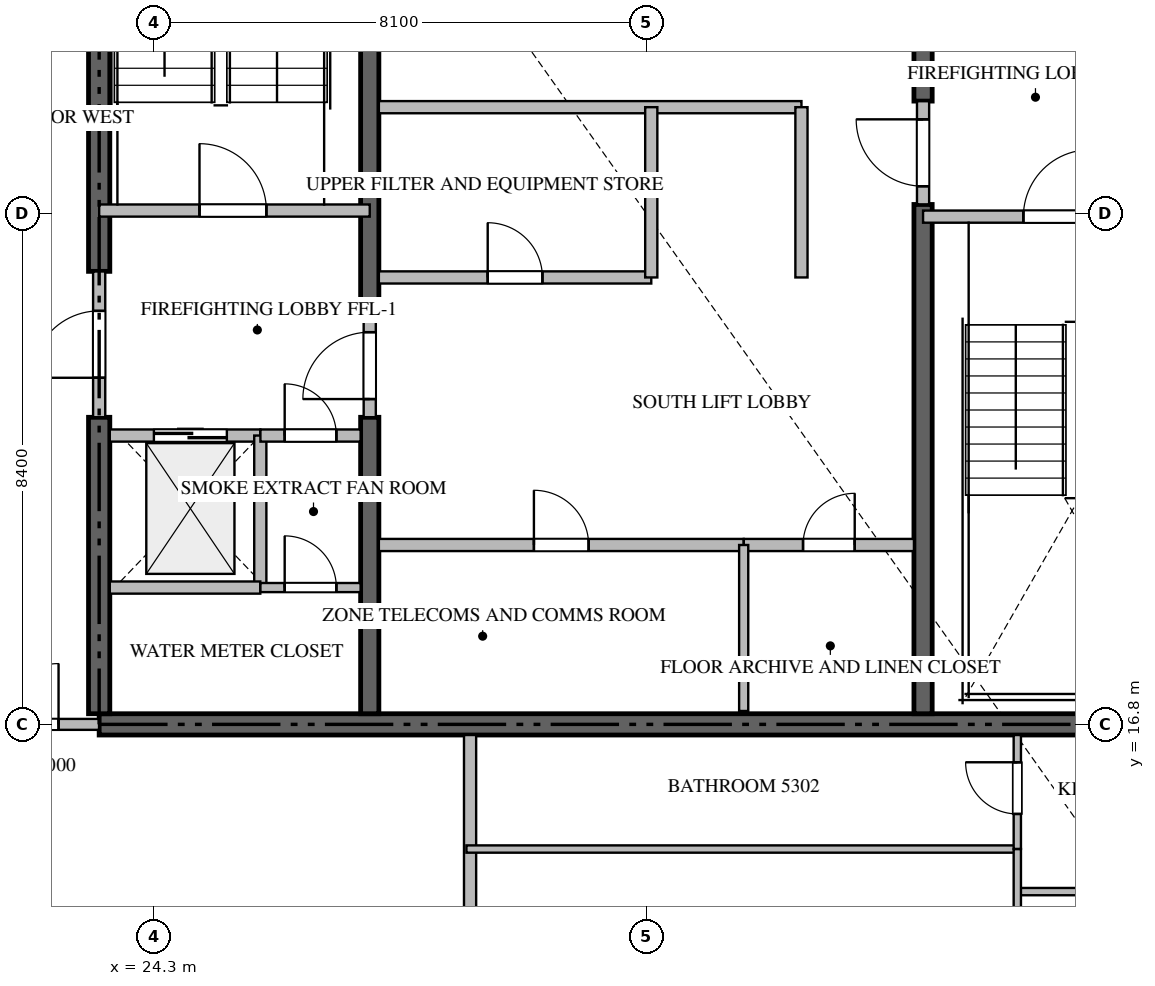
"""IFC4 building model, lengths in metres.
Left out: names, types, materials, properties, quantities, classifications, styles, units other than length and angle.
Written with IfcOpenShell. Run it as: python <this file> out.ifc"""

import sys

from ifc_helpers import new_model, si_unit, direction, frame, frame_2d, origin, place, context, subcontext, project, spatial, rectangle, extrude, source, transform, mapped, element, fill, save


model = new_model("IFC4")
c1 = context("Model", 3, precision=1e-05, world=origin(), true_north=direction((0.0, 1.0)))
c2 = subcontext(c1, "Body", "Model", "MODEL_VIEW")
j1 = project(units=[si_unit("LENGTHUNIT", "METRE"), si_unit("PLANEANGLEUNIT", "RADIAN")], contexts=[c1])
p1 = place(None, origin())
s1 = spatial("IfcSite", under=j1, at=p1, CompositionType="ELEMENT")
p2 = place(p1, origin())
s2 = spatial("IfcBuilding", under=s1, at=p2, CompositionType="ELEMENT")
p3 = place(p2, frame((0.0, 0.0, 214.3)))
s3 = spatial("IfcBuildingStorey", under=s2, at=p3, CompositionType="ELEMENT", Elevation=214.3)
p4 = place(p3, frame((23.4, 16.8, -0.26), z_axis=(0.0, 0.0, 1.0), x_axis=(1.0, 0.0, 0.0)))
e1 = element("IfcWall", 1, at=p4, inside=s3, PredefinedType="SHEAR", context=c2, shape_type="SweptSolid", body=[
    extrude(rectangle(XDim=18.0, YDim=0.35, at=frame_2d((9.0, 0.0))), origin(), (0.0, 0.0, 1.0), 3.848),
])
p5 = place(p3, frame((23.4, 16.975, -0.26), z_axis=(0.0, 0.0, 1.0), x_axis=(0.0, 1.0, 0.0)))
e2 = element("IfcWall", 2, at=p5, inside=s3, PredefinedType="SHEAR", context=c2, shape_type="SweptSolid", body=[
    extrude(rectangle(XDim=4.875, YDim=0.35, at=frame_2d((2.438, 0.0))), origin(), (0.0, 0.0, 1.0), 3.848),
])
p6 = place(p3, frame((23.4, 24.25, -0.26), z_axis=(0.0, 0.0, 1.0), x_axis=(0.0, 1.0, 0.0)))
e3 = element("IfcWall", 3, at=p6, inside=s3, PredefinedType="SHEAR", context=c2, shape_type="SweptSolid", body=[
    extrude(rectangle(XDim=9.175, YDim=0.35, at=frame_2d((4.587, 0.0))), origin(), (0.0, 0.0, 1.0), 3.848),
])
p7 = place(p3, frame((27.85, 16.975, -0.26), z_axis=(0.0, 0.0, 1.0), x_axis=(0.0, 1.0, 0.0)))
e4 = element("IfcWall", 4, at=p7, inside=s3, PredefinedType="SHEAR", context=c2, shape_type="SweptSolid", body=[
    extrude(rectangle(XDim=4.875, YDim=0.3, at=frame_2d((2.438, 0.0))), origin(), (0.0, 0.0, 1.0), 3.848),
])
p8 = place(p3, frame((27.85, 23.55, -0.26), z_axis=(0.0, 0.0, 1.0), x_axis=(0.0, 1.0, 0.0)))
e5 = element("IfcWall", 5, at=p8, inside=s3, PredefinedType="SHEAR", context=c2, shape_type="SweptSolid", body=[
    extrude(rectangle(XDim=9.875, YDim=0.3, at=frame_2d((4.938, 0.0))), origin(), (0.0, 0.0, 1.0), 3.848),
])
p9 = place(p3, frame((36.95, 16.975, -0.26), z_axis=(0.0, 0.0, 1.0), x_axis=(0.0, 1.0, 0.0)))
e6 = element("IfcWall", 6, at=p9, inside=s3, PredefinedType="SHEAR", context=c2, shape_type="SweptSolid", body=[
    extrude(rectangle(XDim=8.375, YDim=0.3, at=frame_2d((4.188, 0.0))), origin(), (0.0, 0.0, 1.0), 3.848),
])
p10 = place(p3, frame((36.95, 27.05, -0.26), z_axis=(0.0, 0.0, 1.0), x_axis=(0.0, 1.0, 0.0)))
e7 = element("IfcWall", 7, at=p10, inside=s3, PredefinedType="SHEAR", context=c2, shape_type="SweptSolid", body=[
    extrude(rectangle(XDim=6.375, YDim=0.3, at=frame_2d((3.188, 0.0))), origin(), (0.0, 0.0, 1.0), 3.848),
])
p11 = place(p3, frame((23.4, 25.25, 0.0), z_axis=(0.0, 0.0, 1.0), x_axis=(1.0, 0.0, 0.0)))
e8 = element("IfcWall", 8, at=p11, inside=s3, PredefinedType="STANDARD", context=c2, shape_type="SweptSolid", body=[
    extrude(rectangle(XDim=4.45, YDim=0.2, at=frame_2d((2.225, 0.0))), origin(), (0.0, 0.0, 1.0), 3.59),
])
p12 = place(p11, frame((1.65, 0.0, 0.0)))
e9 = element("IfcOpeningElement", 9, at=p12, cuts=e8, PredefinedType="OPENING", context=c2, shape_type="SweptSolid", body=[
    extrude(rectangle(XDim=1.1, YDim=2.15, at=frame_2d((0.55, 1.075))), frame((0.0, 0.11, 0.0), z_axis=(0.0, -1.0, 0.0), x_axis=(1.0, 0.0, 0.0)), (0.0, 0.0, 1.0), 0.22),
])
p13 = place(p3, frame((36.95, 25.15, 0.0), z_axis=(0.0, 0.0, 1.0), x_axis=(1.0, 0.0, 0.0)))
e10 = element("IfcWall", 10, at=p13, inside=s3, PredefinedType="STANDARD", context=c2, shape_type="SweptSolid", body=[
    extrude(rectangle(XDim=4.45, YDim=0.2, at=frame_2d((2.225, 0.0))), origin(), (0.0, 0.0, 1.0), 3.59),
])
p14 = place(p13, frame((1.65, 0.0, 0.0)))
e11 = element("IfcOpeningElement", 11, at=p14, cuts=e10, PredefinedType="OPENING", context=c2, shape_type="SweptSolid", body=[
    extrude(rectangle(XDim=1.1, YDim=2.15, at=frame_2d((0.55, 1.075))), frame((0.0, 0.11, 0.0), z_axis=(0.0, -1.0, 0.0), x_axis=(1.0, 0.0, 0.0)), (0.0, 0.0, 1.0), 0.22),
])
p15 = place(p3, frame((23.575, 21.55, 0.0), z_axis=(0.0, 0.0, 1.0), x_axis=(1.0, 0.0, 0.0)))
e12 = element("IfcWall", 12, at=p15, inside=s3, PredefinedType="STANDARD", context=c2, shape_type="SweptSolid", body=[
    extrude(rectangle(XDim=2.475, YDim=0.2, at=frame_2d((1.238, 0.0))), origin(), (0.0, 0.0, 1.0), 3.59),
])
p16 = place(p15, frame((0.725, 0.0, 0.0)))
e13 = element("IfcOpeningElement", 13, at=p16, cuts=e12, PredefinedType="OPENING", context=c2, shape_type="SweptSolid", body=[
    extrude(rectangle(XDim=1.2, YDim=2.2, at=frame_2d((0.6, 1.1))), frame((0.0, 0.11, 0.0), z_axis=(0.0, -1.0, 0.0), x_axis=(1.0, 0.0, 0.0)), (0.0, 0.0, 1.0), 0.22),
])
p17 = place(p3, frame((26.05, 19.05, 0.0), z_axis=(0.0, 0.0, 1.0), x_axis=(0.0, 1.0, 0.0)))
e14 = element("IfcWall", 14, at=p17, inside=s3, PredefinedType="STANDARD", context=c2, shape_type="SweptSolid", body=[
    extrude(rectangle(XDim=2.5, YDim=0.2, at=frame_2d((1.25, 0.0))), origin(), (0.0, 0.0, 1.0), 3.59),
])
p18 = place(p3, frame((23.575, 19.05, 0.0), z_axis=(0.0, 0.0, 1.0), x_axis=(1.0, 0.0, 0.0)))
e15 = element("IfcWall", 15, at=p18, inside=s3, PredefinedType="STANDARD", context=c2, shape_type="SweptSolid", body=[
    extrude(rectangle(XDim=2.475, YDim=0.2, at=frame_2d((1.238, 0.0))), origin(), (0.0, 0.0, 1.0), 3.59),
])
p19 = place(p3, frame((26.052, 21.55, 0.0), z_axis=(0.0, 0.0, 1.0), x_axis=(1.0, 0.0, 0.0)))
e16 = element("IfcWall", 16, at=p19, inside=s3, PredefinedType="STANDARD", context=c2, shape_type="SweptSolid", body=[
    extrude(rectangle(XDim=1.648, YDim=0.2, at=frame_2d((0.824, 0.0))), origin(), (0.0, 0.0, 1.0), 3.59),
])
p20 = place(p19, frame((0.399, 0.0, 0.0)))
e17 = element("IfcOpeningElement", 17, at=p20, cuts=e16, PredefinedType="OPENING", context=c2, shape_type="SweptSolid", body=[
    extrude(rectangle(XDim=0.85, YDim=2.1, at=frame_2d((0.425, 1.05))), frame((0.0, 0.11, 0.0), z_axis=(0.0, -1.0, 0.0), x_axis=(1.0, 0.0, 0.0)), (0.0, 0.0, 1.0), 0.22),
])
p21 = place(p3, frame((23.4, 21.852, 0.0), z_axis=(0.0, 0.0, 1.0), x_axis=(0.0, 1.0, 0.0)))
e18 = element("IfcWall", 18, at=p21, inside=s3, PredefinedType="STANDARD", context=c2, shape_type="SweptSolid", body=[
    extrude(rectangle(XDim=2.396, YDim=0.2, at=frame_2d((1.198, 0.0))), origin(), (0.0, 0.0, 1.0), 3.59),
])
p22 = place(p21, frame((0.648, 0.0, 0.0)))
e19 = element("IfcOpeningElement", 19, at=p22, cuts=e18, PredefinedType="OPENING", context=c2, shape_type="SweptSolid", body=[
    extrude(rectangle(XDim=1.1, YDim=2.15, at=frame_2d((0.55, 1.075))), frame((0.0, 0.11, 0.0), z_axis=(0.0, -1.0, 0.0), x_axis=(1.0, 0.0, 0.0)), (0.0, 0.0, 1.0), 0.22),
])
p23 = place(p3, frame((27.85, 21.852, 0.0), z_axis=(0.0, 0.0, 1.0), x_axis=(0.0, 1.0, 0.0)))
e20 = element("IfcWall", 20, at=p23, inside=s3, PredefinedType="STANDARD", context=c2, shape_type="SweptSolid", body=[
    extrude(rectangle(XDim=1.696, YDim=0.2, at=frame_2d((0.848, 0.0))), origin(), (0.0, 0.0, 1.0), 3.59),
])
p24 = place(p23, frame((0.298, 0.0, 0.0)))
e21 = element("IfcOpeningElement", 21, at=p24, cuts=e20, PredefinedType="OPENING", context=c2, shape_type="SweptSolid", body=[
    extrude(rectangle(XDim=1.1, YDim=2.15, at=frame_2d((0.55, 1.075))), frame((0.0, 0.11, 0.0), z_axis=(0.0, -1.0, 0.0), x_axis=(1.0, 0.0, 0.0)), (0.0, 0.0, 1.0), 0.22),
])
p25 = place(p3, frame((36.95, 25.352, 0.0), z_axis=(0.0, 0.0, 1.0), x_axis=(0.0, 1.0, 0.0)))
e22 = element("IfcWall", 22, at=p25, inside=s3, PredefinedType="STANDARD", context=c2, shape_type="SweptSolid", body=[
    extrude(rectangle(XDim=1.696, YDim=0.2, at=frame_2d((0.848, 0.0))), origin(), (0.0, 0.0, 1.0), 3.59),
])
p26 = place(p25, frame((0.298, 0.0, 0.0)))
e23 = element("IfcOpeningElement", 23, at=p26, cuts=e22, PredefinedType="OPENING", context=c2, shape_type="SweptSolid", body=[
    extrude(rectangle(XDim=1.1, YDim=2.15, at=frame_2d((0.55, 1.075))), frame((0.0, 0.11, 0.0), z_axis=(0.0, -1.0, 0.0), x_axis=(1.0, 0.0, 0.0)), (0.0, 0.0, 1.0), 0.22),
])
p27 = place(p3, frame((26.052, 19.05, 0.0), z_axis=(0.0, 0.0, 1.0), x_axis=(1.0, 0.0, 0.0)))
e24 = element("IfcWall", 24, at=p27, inside=s3, PredefinedType="PARTITIONING", context=c2, shape_type="SweptSolid", body=[
    extrude(rectangle(XDim=1.648, YDim=0.15, at=frame_2d((0.824, 0.0))), origin(), (0.0, 0.0, 1.0), 3.59),
])
p28 = place(p27, frame((0.399, 0.0, 0.0)))
e25 = element("IfcOpeningElement", 25, at=p28, cuts=e24, PredefinedType="OPENING", context=c2, shape_type="SweptSolid", body=[
    extrude(rectangle(XDim=0.85, YDim=2.1, at=frame_2d((0.425, 1.05))), frame((0.0, 0.085, 0.0), z_axis=(0.0, -1.0, 0.0), x_axis=(1.0, 0.0, 0.0)), (0.0, 0.0, 1.0), 0.17),
])
p29 = place(p3, frame((28.0, 19.75, 0.0), z_axis=(0.0, 0.0, 1.0), x_axis=(1.0, 0.0, 0.0)))
e26 = element("IfcWall", 26, at=p29, inside=s3, PredefinedType="STANDARD", context=c2, shape_type="SweptSolid", body=[
    extrude(rectangle(XDim=6.0, YDim=0.2, at=frame_2d((3.0, 0.0))), origin(), (0.0, 0.0, 1.0), 3.59),
])
p30 = place(p29, frame((2.55, 0.0, 0.0)))
e27 = element("IfcOpeningElement", 27, at=p30, cuts=e26, PredefinedType="OPENING", context=c2, shape_type="SweptSolid", body=[
    extrude(rectangle(XDim=0.9, YDim=2.1, at=frame_2d((0.45, 1.05))), frame((0.0, 0.11, 0.0), z_axis=(0.0, -1.0, 0.0), x_axis=(1.0, 0.0, 0.0)), (0.0, 0.0, 1.0), 0.22),
])
p31 = place(p3, frame((34.002, 19.75, 0.0), z_axis=(0.0, 0.0, 1.0), x_axis=(1.0, 0.0, 0.0)))
e28 = element("IfcWall", 28, at=p31, inside=s3, PredefinedType="STANDARD", context=c2, shape_type="SweptSolid", body=[
    extrude(rectangle(XDim=2.798, YDim=0.2, at=frame_2d((1.399, 0.0))), origin(), (0.0, 0.0, 1.0), 3.59),
])
p32 = place(p31, frame((0.974, 0.0, 0.0)))
e29 = element("IfcOpeningElement", 29, at=p32, cuts=e28, PredefinedType="OPENING", context=c2, shape_type="SweptSolid", body=[
    extrude(rectangle(XDim=0.85, YDim=2.1, at=frame_2d((0.425, 1.05))), frame((0.0, 0.11, 0.0), z_axis=(0.0, -1.0, 0.0), x_axis=(1.0, 0.0, 0.0)), (0.0, 0.0, 1.0), 0.22),
])
p33 = place(p3, frame((34.0, 17.02, 0.0), z_axis=(0.0, 0.0, 1.0), x_axis=(0.0, 1.0, 0.0)))
e30 = element("IfcWall", 30, at=p33, inside=s3, PredefinedType="PARTITIONING", context=c2, shape_type="SweptSolid", body=[
    extrude(rectangle(XDim=2.73, YDim=0.15, at=frame_2d((1.365, 0.0))), origin(), (0.0, 0.0, 1.0), 3.59),
])
p34 = place(p3, frame((28.0, 26.95, 0.0), z_axis=(0.0, 0.0, 1.0), x_axis=(1.0, 0.0, 0.0)))
e31 = element("IfcWall", 31, at=p34, inside=s3, PredefinedType="STANDARD", context=c2, shape_type="SweptSolid", body=[
    extrude(rectangle(XDim=6.95, YDim=0.2, at=frame_2d((3.475, 0.0))), origin(), (0.0, 0.0, 1.0), 3.59),
])
p35 = place(p3, frame((34.95, 24.15, 0.0), z_axis=(0.0, 0.0, 1.0), x_axis=(0.0, 1.0, 0.0)))
e32 = element("IfcWall", 32, at=p35, inside=s3, PredefinedType="STANDARD", context=c2, shape_type="SweptSolid", body=[
    extrude(rectangle(XDim=2.8, YDim=0.2, at=frame_2d((1.4, 0.0))), origin(), (0.0, 0.0, 1.0), 3.59),
])
p36 = place(p3, frame((28.0, 24.15, 0.0), z_axis=(0.0, 0.0, 1.0), x_axis=(1.0, 0.0, 0.0)))
e33 = element("IfcWall", 33, at=p36, inside=s3, PredefinedType="STANDARD", context=c2, shape_type="SweptSolid", body=[
    extrude(rectangle(XDim=4.48, YDim=0.2, at=frame_2d((2.24, 0.0))), origin(), (0.0, 0.0, 1.0), 3.59),
])
p37 = place(p36, frame((1.79, 0.0, 0.0)))
e34 = element("IfcOpeningElement", 34, at=p37, cuts=e33, PredefinedType="OPENING", context=c2, shape_type="SweptSolid", body=[
    extrude(rectangle(XDim=0.9, YDim=2.1, at=frame_2d((0.45, 1.05))), frame((0.0, 0.11, 0.0), z_axis=(0.0, -1.0, 0.0), x_axis=(1.0, 0.0, 0.0)), (0.0, 0.0, 1.0), 0.22),
])
p38 = place(p3, frame((32.48, 24.15, 0.0), z_axis=(0.0, 0.0, 1.0), x_axis=(0.0, 1.0, 0.0)))
e35 = element("IfcWall", 35, at=p38, inside=s3, PredefinedType="STANDARD", context=c2, shape_type="SweptSolid", body=[
    extrude(rectangle(XDim=2.8, YDim=0.2, at=frame_2d((1.4, 0.0))), origin(), (0.0, 0.0, 1.0), 3.59),
])
p39 = place(p3, frame((29.5, 1.282, 0.0), z_axis=(0.0, 0.0, 1.0), x_axis=(0.0, 1.0, 0.0)))
e36 = element("IfcWall", 36, at=p39, inside=s3, PredefinedType="PARTITIONING", context=c2, shape_type="SweptSolid", body=[
    extrude(rectangle(XDim=15.343, YDim=0.2, at=frame_2d((7.671, 0.0))), origin(), (0.0, 0.0, 1.0), 3.59),
])
p40 = place(p3, frame((20.902, 16.8, 0.0), z_axis=(0.0, 0.0, 1.0), x_axis=(1.0, 0.0, 0.0)))
e37 = element("IfcWall", 37, at=p40, inside=s3, PredefinedType="PARTITIONING", context=c2, shape_type="SweptSolid", body=[
    extrude(rectangle(XDim=2.496, YDim=0.18, at=frame_2d((1.248, 0.0))), origin(), (0.0, 0.0, 1.0), 3.59),
])
p41 = place(p40, frame((0.83, 0.0, 0.0)))
e38 = element("IfcOpeningElement", 38, at=p41, cuts=e37, PredefinedType="OPENING", context=c2, shape_type="SweptSolid", body=[
    extrude(rectangle(XDim=1.0, YDim=2.15, at=frame_2d((0.5, 1.075))), frame((0.0, 0.1, 0.0), z_axis=(0.0, -1.0, 0.0), x_axis=(1.0, 0.0, 0.0)), (0.0, 0.0, 1.0), 0.2),
])
p42 = place(p3, frame((38.5, 14.05, 0.0), z_axis=(0.0, 0.0, 1.0), x_axis=(1.0, 0.0, 0.0)))
e39 = element("IfcWall", 39, at=p42, inside=s3, PredefinedType="PARTITIONING", context=c2, shape_type="SweptSolid", body=[
    extrude(rectangle(XDim=2.85, YDim=0.12, at=frame_2d((1.425, 0.0))), origin(), (0.0, 0.0, 1.0), 3.59),
])
p43 = place(p42, frame((1.0, 0.0, 0.0)))
e40 = element("IfcOpeningElement", 40, at=p43, cuts=e39, PredefinedType="OPENING", context=c2, shape_type="SweptSolid", body=[
    extrude(rectangle(XDim=0.85, YDim=2.1, at=frame_2d((0.425, 1.05))), frame((0.0, 0.07, 0.0), z_axis=(0.0, -1.0, 0.0), x_axis=(1.0, 0.0, 0.0)), (0.0, 0.0, 1.0), 0.14),
])
p44 = place(p3, frame((29.44, 14.75, 0.0), z_axis=(0.0, 0.0, 1.0), x_axis=(1.0, 0.0, 0.0)))
e41 = element("IfcWall", 41, at=p44, inside=s3, PredefinedType="PARTITIONING", context=c2, shape_type="SweptSolid", body=[
    extrude(rectangle(XDim=9.06, YDim=0.12, at=frame_2d((4.53, 0.0))), origin(), (0.0, 0.0, 1.0), 3.59),
])
p45 = place(p3, frame((38.5, 6.024, 0.0), z_axis=(0.0, 0.0, 1.0), x_axis=(0.0, 1.0, 0.0)))
e42 = element("IfcWall", 42, at=p45, inside=s3, PredefinedType="PARTITIONING", context=c2, shape_type="SweptSolid", body=[
    extrude(rectangle(XDim=8.726, YDim=0.12, at=frame_2d((4.363, 0.0))), origin(), (0.0, 0.0, 1.0), 3.59),
])
p46 = place(p45, frame((3.938, 0.0, 0.0)))
e43 = element("IfcOpeningElement", 43, at=p46, cuts=e42, PredefinedType="OPENING", context=c2, shape_type="SweptSolid", body=[
    extrude(rectangle(XDim=0.85, YDim=2.1, at=frame_2d((0.425, 1.05))), frame((0.0, 0.07, 0.0), z_axis=(0.0, -1.0, 0.0), x_axis=(1.0, 0.0, 0.0)), (0.0, 0.0, 1.0), 0.14),
])
p47 = place(p3, frame((38.5, 14.752, 0.0), z_axis=(0.0, 0.0, 1.0), x_axis=(0.0, 1.0, 0.0)))
e44 = element("IfcWall", 44, at=p47, inside=s3, PredefinedType="PARTITIONING", context=c2, shape_type="SweptSolid", body=[
    extrude(rectangle(XDim=1.873, YDim=0.12, at=frame_2d((0.937, 0.0))), origin(), (0.0, 0.0, 1.0), 3.59),
])
p48 = place(p47, frame((0.575, 0.0, 0.0)))
e45 = element("IfcOpeningElement", 45, at=p48, cuts=e44, PredefinedType="OPENING", context=c2, shape_type="SweptSolid", body=[
    extrude(rectangle(XDim=0.85, YDim=2.1, at=frame_2d((0.425, 1.05))), frame((0.0, 0.07, 0.0), z_axis=(0.0, -1.0, 0.0), x_axis=(1.0, 0.0, 0.0)), (0.0, 0.0, 1.0), 0.14),
])
m1 = source(origin(), c2, "Body", "SweptSolid", [
    extrude(rectangle(XDim=1.1, YDim=2.15, at=frame_2d((0.55, 1.075))), frame((0.0, 0.025, 0.0), z_axis=(0.0, -1.0, 0.0), x_axis=(1.0, 0.0, 0.0)), (0.0, 0.0, 1.0), 0.05),
])
p49 = place(p12, origin())
e46 = element("IfcDoor", 46, at=p49, inside=s3, OperationType="SINGLE_SWING_LEFT", PredefinedType="DOOR", context=c2, shape_type="MappedRepresentation", body=[
    mapped(m1, transform((0.0, 0.0, 0.0), scale=1.0)),
])
fill(e9, e46)
p50 = place(p14, origin())
e47 = element("IfcDoor", 47, at=p50, inside=s3, OperationType="SINGLE_SWING_RIGHT", PredefinedType="DOOR", context=c2, shape_type="MappedRepresentation", body=[
    mapped(m1, transform((0.0, 0.0, 0.0), scale=1.0)),
])
fill(e11, e47)
m2 = source(origin(), c2, "Body", "SweptSolid", [
    extrude(rectangle(XDim=1.2, YDim=2.2, at=frame_2d((0.6, 1.1))), frame((0.0, 0.025, 0.0), z_axis=(0.0, -1.0, 0.0), x_axis=(1.0, 0.0, 0.0)), (0.0, 0.0, 1.0), 0.05),
])
p51 = place(p16, origin())
e48 = element("IfcDoor", 48, at=p51, inside=s3, OperationType="DOUBLE_DOOR_SLIDING", PredefinedType="DOOR", context=c2, shape_type="MappedRepresentation", body=[
    mapped(m2, transform((0.0, 0.0, 0.0), scale=1.0)),
])
fill(e13, e48)
m3 = source(origin(), c2, "Body", "SweptSolid", [
    extrude(rectangle(XDim=0.85, YDim=2.1, at=frame_2d((0.425, 1.05))), frame((0.0, 0.025, 0.0), z_axis=(0.0, -1.0, 0.0), x_axis=(1.0, 0.0, 0.0)), (0.0, 0.0, 1.0), 0.05),
])
p52 = place(p20, origin())
e49 = element("IfcDoor", 49, at=p52, inside=s3, OperationType="SINGLE_SWING_LEFT", PredefinedType="DOOR", context=c2, shape_type="MappedRepresentation", body=[
    mapped(m3, transform((0.0, 0.0, 0.0), scale=1.0)),
])
fill(e17, e49)
p53 = place(p22, origin())
e50 = element("IfcDoor", 50, at=p53, inside=s3, OperationType="SINGLE_SWING_LEFT", PredefinedType="DOOR", context=c2, shape_type="MappedRepresentation", body=[
    mapped(m1, transform((0.0, 0.0, 0.0), scale=1.0)),
])
fill(e19, e50)
p54 = place(p24, origin())
e51 = element("IfcDoor", 51, at=p54, inside=s3, OperationType="SINGLE_SWING_LEFT", PredefinedType="DOOR", context=c2, shape_type="MappedRepresentation", body=[
    mapped(m1, transform((0.0, 0.0, 0.0), scale=1.0)),
])
fill(e21, e51)
p55 = place(p26, origin())
e52 = element("IfcDoor", 52, at=p55, inside=s3, OperationType="SINGLE_SWING_RIGHT", PredefinedType="DOOR", context=c2, shape_type="MappedRepresentation", body=[
    mapped(m1, transform((0.0, 0.0, 0.0), scale=1.0)),
])
fill(e23, e52)
p56 = place(p28, origin())
e53 = element("IfcDoor", 53, at=p56, inside=s3, OperationType="SINGLE_SWING_LEFT", PredefinedType="DOOR", context=c2, shape_type="MappedRepresentation", body=[
    mapped(m3, transform((0.0, 0.0, 0.0), scale=1.0)),
])
fill(e25, e53)
m4 = source(origin(), c2, "Body", "SweptSolid", [
    extrude(rectangle(XDim=0.9, YDim=2.1, at=frame_2d((0.45, 1.05))), frame((0.0, 0.025, 0.0), z_axis=(0.0, -1.0, 0.0), x_axis=(1.0, 0.0, 0.0)), (0.0, 0.0, 1.0), 0.05),
])
p57 = place(p30, origin())
e54 = element("IfcDoor", 54, at=p57, inside=s3, OperationType="SINGLE_SWING_LEFT", PredefinedType="DOOR", context=c2, shape_type="MappedRepresentation", body=[
    mapped(m4, transform((0.0, 0.0, 0.0), scale=1.0)),
])
fill(e27, e54)
p58 = place(p32, origin())
e55 = element("IfcDoor", 55, at=p58, inside=s3, OperationType="SINGLE_SWING_RIGHT", PredefinedType="DOOR", context=c2, shape_type="MappedRepresentation", body=[
    mapped(m3, transform((0.0, 0.0, 0.0), scale=1.0)),
])
fill(e29, e55)
p59 = place(p37, origin())
e56 = element("IfcDoor", 56, at=p59, inside=s3, OperationType="SINGLE_SWING_LEFT", PredefinedType="DOOR", context=c2, shape_type="MappedRepresentation", body=[
    mapped(m4, transform((0.0, 0.0, 0.0), scale=1.0)),
])
fill(e34, e56)
m5 = source(origin(), c2, "Body", "SweptSolid", [
    extrude(rectangle(XDim=1.0, YDim=2.15, at=frame_2d((0.5, 1.075))), frame((0.0, 0.025, 0.0), z_axis=(0.0, -1.0, 0.0), x_axis=(1.0, 0.0, 0.0)), (0.0, 0.0, 1.0), 0.05),
])
p60 = place(p41, origin())
e57 = element("IfcDoor", 57, at=p60, inside=s3, OperationType="SINGLE_SWING_RIGHT", PredefinedType="DOOR", context=c2, shape_type="MappedRepresentation", body=[
    mapped(m5, transform((0.0, 0.0, 0.0), scale=1.0)),
])
fill(e38, e57)
p61 = place(p48, origin())
e58 = element("IfcDoor", 58, at=p61, inside=s3, OperationType="SINGLE_SWING_RIGHT", PredefinedType="DOOR", context=c2, shape_type="MappedRepresentation", body=[
    mapped(m3, transform((0.0, 0.0, 0.0), scale=1.0)),
])
fill(e45, e58)
save(model, sys.argv[1])
